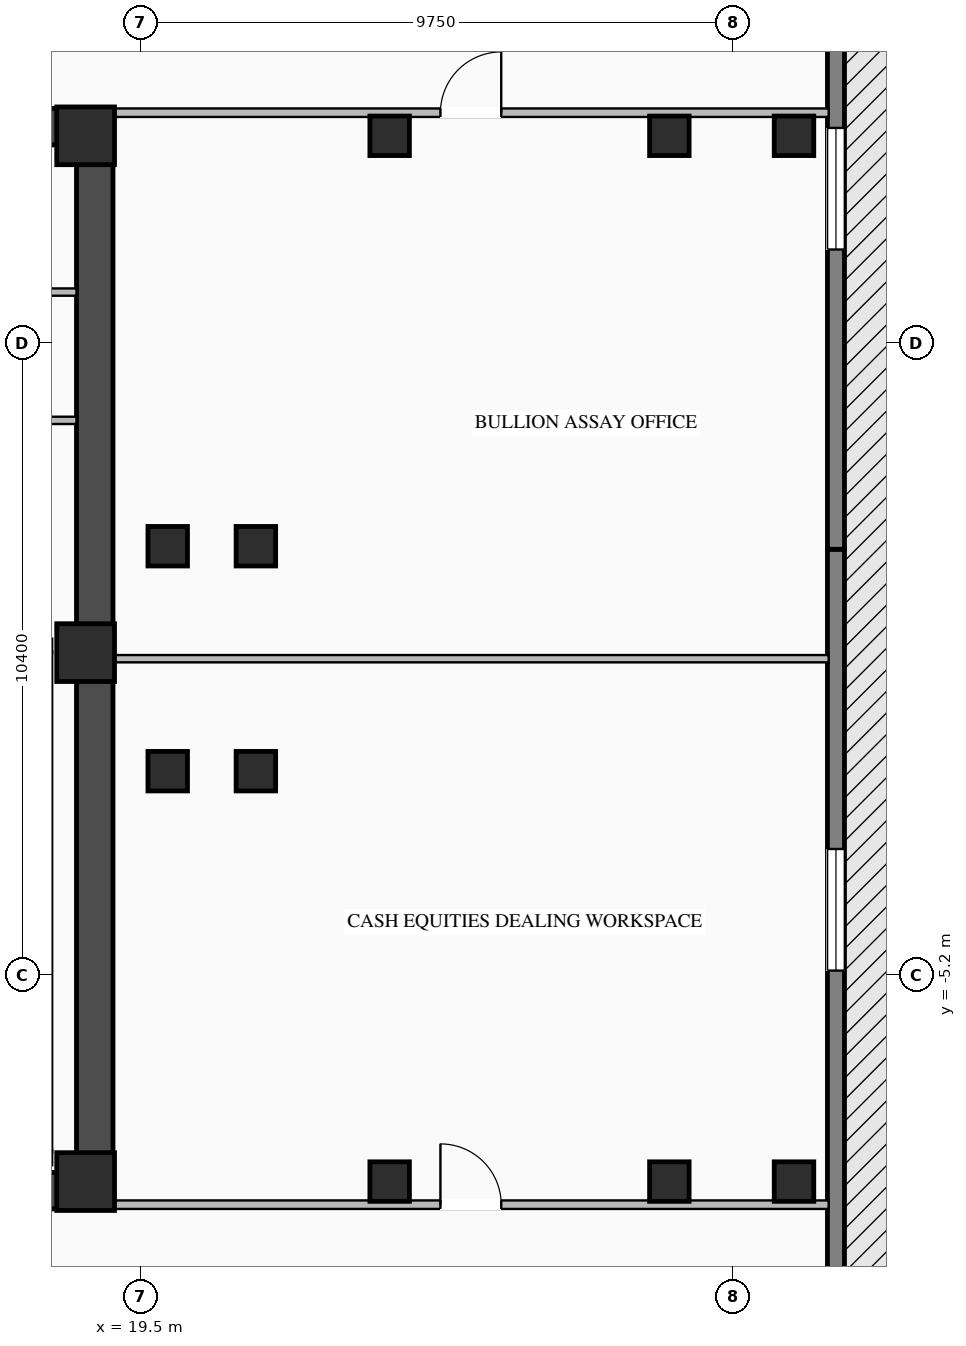
"""IFC4 building model, lengths in metres.
Left out: names, types, materials, properties, quantities, classifications, styles, units other than length and angle.
Written with IfcOpenShell. Run it as: python <this file> out.ifc"""

import sys

from ifc_helpers import new_model, si_unit, direction, frame, frame_2d, origin, origin_2d, place, context, subcontext, project, spatial, rectangle, i_section, extrude, element, fill, save


model = new_model("IFC4")
c1 = context("Model", 3, precision=1e-05, world=origin(), true_north=direction((0.0, 1.0)))
c2 = subcontext(c1, "Body", "Model", "MODEL_VIEW")
j1 = project(units=[si_unit("LENGTHUNIT", "METRE"), si_unit("PLANEANGLEUNIT", "RADIAN")], contexts=[c1])
p1 = place(None, origin())
s1 = spatial("IfcSite", under=j1, at=p1, CompositionType="ELEMENT")
p2 = place(p1, origin())
s2 = spatial("IfcBuilding", under=s1, at=p2, CompositionType="ELEMENT")
p3 = place(p2, frame((0.0, 0.0, 116.65)))
s3 = spatial("IfcBuildingStorey", under=s2, at=p3, CompositionType="ELEMENT", Elevation=116.65)
p4 = place(p3, frame((8.8, -8.75, 0.0), z_axis=(0.0, 0.0, 1.0), x_axis=(1.0, 0.0, 0.0)))
e1 = element("IfcWall", 1, at=p4, inside=s3, PredefinedType="SHEAR", context=c2, shape_type="SweptSolid", body=[
    extrude(rectangle(XDim=10.25, YDim=0.6, at=frame_2d((5.125, 0.0))), origin(), (0.0, 0.0, 1.0), 4.02),
])
p5 = place(p3, frame((8.8, 8.75, 0.0), z_axis=(0.0, 0.0, 1.0), x_axis=(1.0, 0.0, 0.0)))
e2 = element("IfcWall", 2, at=p5, inside=s3, PredefinedType="SHEAR", context=c2, shape_type="SweptSolid", body=[
    extrude(rectangle(XDim=10.25, YDim=0.6, at=frame_2d((5.125, 0.0))), origin(), (0.0, 0.0, 1.0), 4.02),
])
p6 = place(p5, frame((3.25, 0.0, 0.0)))
e3 = element("IfcOpeningElement", 3, at=p6, cuts=e2, PredefinedType="OPENING", context=c2, shape_type="SweptSolid", body=[
    extrude(rectangle(XDim=1.4, YDim=2.05, at=frame_2d((0.7, 1.025))), frame((0.0, 0.31, 0.0), z_axis=(0.0, -1.0, 0.0), x_axis=(1.0, 0.0, 0.0)), (0.0, 0.0, 1.0), 0.62),
])
p7 = place(p3, frame((18.75, -8.45, 0.0), z_axis=(0.0, 0.0, 1.0), x_axis=(0.0, 1.0, 0.0)))
e4 = element("IfcWall", 4, at=p7, inside=s3, PredefinedType="SHEAR", context=c2, shape_type="SweptSolid", body=[
    extrude(rectangle(XDim=16.9, YDim=0.6, at=frame_2d((8.45, 0.0))), origin(), (0.0, 0.0, 1.0), 4.02),
])
for number, where, z_axis, x_axis in (
    (5, (18.6, -8.6, 0.0), (0.0, 0.0, 1.0), (1.0, 0.0, 0.0)),
    (6, (18.6, 0.1, 0.0), (0.0, 0.0, 1.0), (1.0, 0.0, 0.0)),
    (7, (18.6, 8.6, 0.0), (0.0, 0.0, 1.0), (1.0, 0.0, 0.0)),
):
    element("IfcColumn", number, at=place(p3, frame(where, z_axis=z_axis, x_axis=x_axis)), inside=s3, PredefinedType="COLUMN", context=c2, shape_type="SweptSolid", body=[
        extrude(rectangle(XDim=0.95, YDim=0.95, at=origin_2d()), origin(), (0.0, 0.0, 1.0), 4.2),
    ])
for number, where, z_axis, x_axis in (
    (8, (19.95, -1.85, 0.0), (0.0, 0.0, 1.0), (1.0, 0.0, 0.0)),
    (9, (19.95, 1.85, 0.0), (0.0, 0.0, 1.0), (1.0, 0.0, 0.0)),
    (10, (21.4, -1.85, 0.0), (0.0, 0.0, 1.0), (1.0, 0.0, 0.0)),
    (11, (21.4, 1.85, 0.0), (0.0, 0.0, 1.0), (1.0, 0.0, 0.0)),
    (12, (23.6, -8.6, 0.0), (0.0, 0.0, 1.0), (1.0, 0.0, 0.0)),
    (13, (23.6, 8.6, 0.0), (0.0, 0.0, 1.0), (1.0, 0.0, 0.0)),
    (14, (28.2, -8.6, 0.0), (0.0, 0.0, 1.0), (1.0, 0.0, 0.0)),
    (15, (28.2, 8.6, 0.0), (0.0, 0.0, 1.0), (1.0, 0.0, 0.0)),
):
    element("IfcColumn", number, at=place(p3, frame(where, z_axis=z_axis, x_axis=x_axis)), inside=s3, PredefinedType="COLUMN", context=c2, shape_type="SweptSolid", body=[
        extrude(i_section(OverallWidth=0.65, OverallDepth=0.65, WebThickness=0.028, FlangeThickness=0.04, at=origin_2d()), origin(), (0.0, 0.0, 1.0), 4.2),
    ])
for number, where, z_axis, x_axis in (
    (16, (30.25, -8.6, -0.28), (0.0, 0.0, 1.0), (1.0, 0.0, 0.0)),
    (17, (30.25, 8.6, -0.28), (0.0, 0.0, 1.0), (1.0, 0.0, 0.0)),
):
    element("IfcColumn", number, at=place(p3, frame(where, z_axis=z_axis, x_axis=x_axis)), inside=s3, PredefinedType="COLUMN", context=c2, shape_type="SweptSolid", body=[
        extrude(i_section(OverallWidth=0.65, OverallDepth=0.65, WebThickness=0.028, FlangeThickness=0.04, at=origin_2d()), origin(), (0.0, 0.0, 1.0), 4.48),
    ])
p8 = place(p3, frame((30.94, 1.8, 0.0), z_axis=(0.0, 0.0, 1.0), x_axis=(0.0, -1.0, 0.0)))
e18 = element("IfcWall", 18, at=p8, inside=s3, PredefinedType="STANDARD", context=c2, shape_type="SweptSolid", body=[
    extrude(rectangle(XDim=17.79, YDim=0.28, at=frame_2d((8.895, 0.0))), origin(), (0.0, 0.0, 1.0), 4.0),
])
p9 = place(p8, frame((4.93, 0.0, 0.76)))
e19 = element("IfcOpeningElement", 19, at=p9, cuts=e18, PredefinedType="OPENING", context=c2, shape_type="SweptSolid", body=[
    extrude(rectangle(XDim=2.0, YDim=2.05, at=frame_2d((1.0, 1.025))), frame((0.0, 0.15, 0.0), z_axis=(0.0, -1.0, 0.0), x_axis=(1.0, 0.0, 0.0)), (0.0, 0.0, 1.0), 0.3),
])
p10 = place(p3, frame((30.94, 19.59, 0.0), z_axis=(0.0, 0.0, 1.0), x_axis=(0.0, -1.0, 0.0)))
e20 = element("IfcWall", 20, at=p10, inside=s3, PredefinedType="STANDARD", context=c2, shape_type="SweptSolid", body=[
    extrude(rectangle(XDim=17.79, YDim=0.28, at=frame_2d((8.895, 0.0))), origin(), (0.0, 0.0, 1.0), 4.0),
])
p11 = place(p10, frame((4.93, 0.0, 0.76)))
e21 = element("IfcOpeningElement", 21, at=p11, cuts=e20, PredefinedType="OPENING", context=c2, shape_type="SweptSolid", body=[
    extrude(rectangle(XDim=2.0, YDim=2.05, at=frame_2d((1.0, 1.025))), frame((0.0, 0.15, 0.0), z_axis=(0.0, -1.0, 0.0), x_axis=(1.0, 0.0, 0.0)), (0.0, 0.0, 1.0), 0.3),
])
p12 = place(p10, frame((10.86, 0.0, 0.76)))
e22 = element("IfcOpeningElement", 22, at=p12, cuts=e20, PredefinedType="OPENING", context=c2, shape_type="SweptSolid", body=[
    extrude(rectangle(XDim=2.0, YDim=2.05, at=frame_2d((1.0, 1.025))), frame((0.0, 0.15, 0.0), z_axis=(0.0, -1.0, 0.0), x_axis=(1.0, 0.0, 0.0)), (0.0, 0.0, 1.0), 0.3),
])
p13 = place(p3, frame((13.9, 3.92, 0.0), z_axis=(0.0, 0.0, 1.0), x_axis=(1.0, 0.0, 0.0)))
e23 = element("IfcWall", 23, at=p13, inside=s3, PredefinedType="STANDARD", context=c2, shape_type="SweptSolid", body=[
    extrude(rectangle(XDim=4.55, YDim=0.12, at=frame_2d((2.275, 0.0))), origin(), (0.0, 0.0, 1.0), 4.0),
])
p14 = place(p3, frame((16.15, 6.03, 0.0), z_axis=(0.0, 0.0, 1.0), x_axis=(1.0, 0.0, 0.0)))
e24 = element("IfcWall", 24, at=p14, inside=s3, PredefinedType="STANDARD", context=c2, shape_type="SweptSolid", body=[
    extrude(rectangle(XDim=2.3, YDim=0.12, at=frame_2d((1.15, 0.0))), origin(), (0.0, 0.0, 1.0), 4.0),
])
p15 = place(p3, frame((19.05, 8.98, 0.0), z_axis=(0.0, 0.0, 1.0), x_axis=(1.0, 0.0, 0.0)))
e25 = element("IfcWall", 25, at=p15, inside=s3, PredefinedType="STANDARD", context=c2, shape_type="SweptSolid", body=[
    extrude(rectangle(XDim=11.77, YDim=0.14, at=frame_2d((5.885, 0.0))), origin(), (0.0, 0.0, 1.0), 4.0),
])
p16 = place(p15, frame((5.385, 0.0, 0.0)))
e26 = element("IfcOpeningElement", 26, at=p16, cuts=e25, PredefinedType="OPENING", context=c2, shape_type="SweptSolid", body=[
    extrude(rectangle(XDim=1.0, YDim=2.08, at=frame_2d((0.5, 1.04))), frame((0.0, 0.08, 0.0), z_axis=(0.0, -1.0, 0.0), x_axis=(1.0, 0.0, 0.0)), (0.0, 0.0, 1.0), 0.16),
])
p17 = place(p3, frame((19.05, -8.98, 0.0), z_axis=(0.0, 0.0, 1.0), x_axis=(1.0, 0.0, 0.0)))
e27 = element("IfcWall", 27, at=p17, inside=s3, PredefinedType="STANDARD", context=c2, shape_type="SweptSolid", body=[
    extrude(rectangle(XDim=11.77, YDim=0.14, at=frame_2d((5.885, 0.0))), origin(), (0.0, 0.0, 1.0), 4.0),
])
p18 = place(p17, frame((5.385, 0.0, 0.0)))
e28 = element("IfcOpeningElement", 28, at=p18, cuts=e27, PredefinedType="OPENING", context=c2, shape_type="SweptSolid", body=[
    extrude(rectangle(XDim=1.0, YDim=2.08, at=frame_2d((0.5, 1.04))), frame((0.0, 0.08, 0.0), z_axis=(0.0, -1.0, 0.0), x_axis=(1.0, 0.0, 0.0)), (0.0, 0.0, 1.0), 0.16),
])
p19 = place(p3, frame((19.05, 0.0, 0.0), z_axis=(0.0, 0.0, 1.0), x_axis=(1.0, 0.0, 0.0)))
e29 = element("IfcWall", 29, at=p19, inside=s3, PredefinedType="STANDARD", context=c2, shape_type="SweptSolid", body=[
    extrude(rectangle(XDim=11.77, YDim=0.12, at=frame_2d((5.885, 0.0))), origin(), (0.0, 0.0, 1.0), 3.545),
])
p20 = place(p9, origin())
e30 = element("IfcWindow", 30, at=p20, inside=s3, PartitioningType="DOUBLE_PANEL_VERTICAL", PredefinedType="WINDOW", context=c2, shape_type="SweptSolid", body=[
    extrude(rectangle(XDim=2.0, YDim=2.05, at=frame_2d((1.0, 1.025))), frame((0.0, 0.03, 0.0), z_axis=(0.0, -1.0, 0.0), x_axis=(1.0, 0.0, 0.0)), (0.0, 0.0, 1.0), 0.06),
])
fill(e19, e30)
p21 = place(p12, origin())
e31 = element("IfcWindow", 31, at=p21, inside=s3, PartitioningType="DOUBLE_PANEL_VERTICAL", PredefinedType="WINDOW", context=c2, shape_type="SweptSolid", body=[
    extrude(rectangle(XDim=2.0, YDim=2.05, at=frame_2d((1.0, 1.025))), frame((0.0, 0.03, 0.0), z_axis=(0.0, -1.0, 0.0), x_axis=(1.0, 0.0, 0.0)), (0.0, 0.0, 1.0), 0.06),
])
fill(e22, e31)
p22 = place(p16, origin())
e32 = element("IfcDoor", 32, at=p22, inside=s3, OperationType="SINGLE_SWING_RIGHT", PredefinedType="DOOR", context=c2, shape_type="SweptSolid", body=[
    extrude(rectangle(XDim=1.0, YDim=2.08, at=frame_2d((0.5, 1.04))), frame((0.0, 0.025, 0.0), z_axis=(0.0, -1.0, 0.0), x_axis=(1.0, 0.0, 0.0)), (0.0, 0.0, 1.0), 0.05),
])
fill(e26, e32)
p23 = place(p18, origin())
e33 = element("IfcDoor", 33, at=p23, inside=s3, OperationType="SINGLE_SWING_LEFT", PredefinedType="DOOR", context=c2, shape_type="SweptSolid", body=[
    extrude(rectangle(XDim=1.0, YDim=2.08, at=frame_2d((0.5, 1.04))), frame((0.0, 0.025, 0.0), z_axis=(0.0, -1.0, 0.0), x_axis=(1.0, 0.0, 0.0)), (0.0, 0.0, 1.0), 0.05),
])
fill(e28, e33)
save(model, sys.argv[1])
